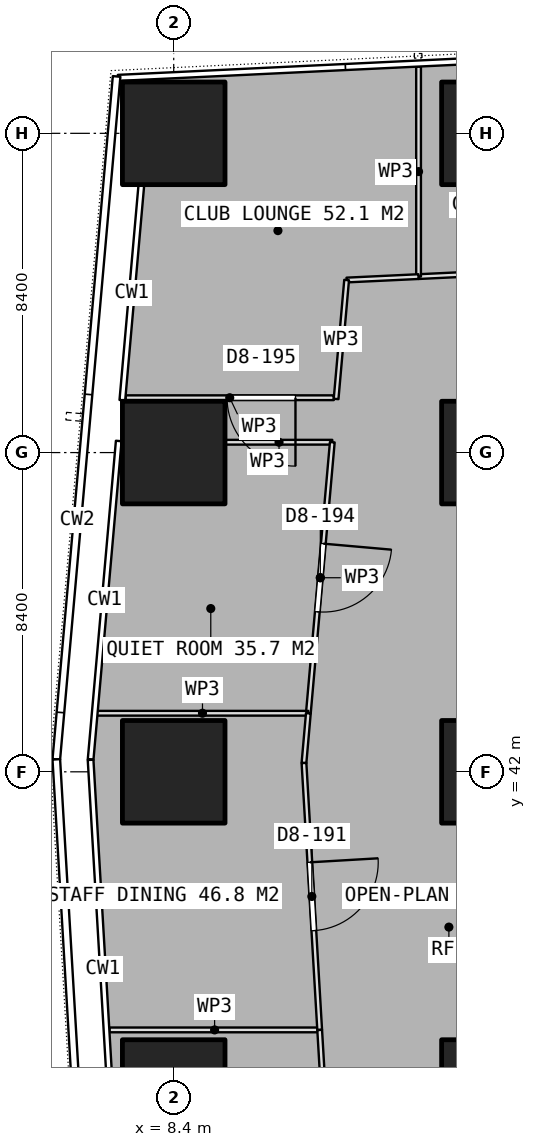
"""IFC4 building model, lengths in metres.
Left out: names, types, materials, properties, quantities, classifications, styles, units other than length and angle.
Written with IfcOpenShell. Run it as: python <this file> out.ifc"""

import sys

from ifc_helpers import new_model, si_unit, direction, frame, frame_2d, origin, origin_2d, place, context, subcontext, project, spatial, rectangle, extrude, element, fill, save


model = new_model("IFC4")
c1 = context("Model", 3, precision=1e-05, world=origin(), true_north=direction((0.0, 1.0)))
c2 = subcontext(c1, "Body", "Model", "MODEL_VIEW")
j1 = project(units=[si_unit("LENGTHUNIT", "METRE"), si_unit("PLANEANGLEUNIT", "RADIAN")], contexts=[c1])
p1 = place(None, origin())
s1 = spatial("IfcSite", under=j1, at=p1, CompositionType="ELEMENT")
p2 = place(p1, origin())
s2 = spatial("IfcBuilding", under=s1, at=p2, CompositionType="ELEMENT")
p3 = place(p2, frame((0.0, 0.0, 172.7)))
s3 = spatial("IfcBuildingStorey", under=s2, at=p3, CompositionType="ELEMENT", Elevation=172.7)
for number, where, z_axis, x_axis in (
    (1, (8.4, 33.6, 0.0), (0.0, 0.0, 1.0), (1.0, 0.0, 0.0)),
    (2, (8.4, 42.0, 0.0), (0.0, 0.0, 1.0), (1.0, 0.0, 0.0)),
    (3, (8.4, 50.4, 0.0), (0.0, 0.0, 1.0), (1.0, 0.0, 0.0)),
    (4, (8.4, 58.8, 0.0), (0.0, 0.0, 1.0), (1.0, 0.0, 0.0)),
    (5, (16.8, 33.6, 0.0), (0.0, 0.0, 1.0), (1.0, 0.0, 0.0)),
    (6, (16.8, 42.0, 0.0), (0.0, 0.0, 1.0), (1.0, 0.0, 0.0)),
    (7, (16.8, 50.4, 0.0), (0.0, 0.0, 1.0), (1.0, 0.0, 0.0)),
    (8, (16.8, 58.8, 0.0), (0.0, 0.0, 1.0), (1.0, 0.0, 0.0)),
):
    element("IfcColumn", number, at=place(p3, frame(where, z_axis=z_axis, x_axis=x_axis)), inside=s3, PredefinedType="COLUMN", context=c2, shape_type="SweptSolid", body=[
        extrude(rectangle(XDim=2.7, YDim=2.7, at=origin_2d()), origin(), (0.0, 0.0, 1.0), 3.75),
    ])
p4 = place(p3, frame((22.4, 55.392, 0.0), z_axis=(0.0, 0.0, 1.0), x_axis=(-0.998854223515, -0.047856453768, 0.0)))
e9 = element("IfcWall", 9, at=p4, inside=s3, PredefinedType="PARTITIONING", context=c2, shape_type="SweptSolid", body=[
    extrude(rectangle(XDim=7.566, YDim=0.125, at=frame_2d((3.783, 0.0))), origin(), (0.0, 0.0, 1.0), 3.5),
])
p5 = place(p4, frame((2.883, 0.0, 0.0)))
e10 = element("IfcOpeningElement", 10, at=p5, cuts=e9, PredefinedType="OPENING", context=c2, shape_type="SweptSolid", body=[
    extrude(rectangle(XDim=1.8, YDim=2.1, at=frame_2d((0.9, 1.05))), frame((0.0, 0.073, 0.0), z_axis=(0.0, -1.0, 0.0), x_axis=(1.0, 0.0, 0.0)), (0.0, 0.0, 1.0), 0.145),
])
p6 = place(p3, frame((14.843, 55.03, 0.0), z_axis=(0.0, 0.0, 1.0), x_axis=(0.0, 1.0, 0.0)))
e11 = element("IfcWall", 11, at=p6, inside=s3, PredefinedType="PARTITIONING", context=c2, shape_type="SweptSolid", body=[
    extrude(rectangle(XDim=5.527, YDim=0.125, at=frame_2d((2.763, 0.0))), origin(), (0.0, 0.0, 1.0), 3.5),
])
p7 = place(p3, frame((12.613, 51.843, 0.0), z_axis=(0.0, 0.0, 1.0), x_axis=(-1.0, 0.0, 0.0)))
e12 = element("IfcWall", 12, at=p7, inside=s3, PredefinedType="PARTITIONING", context=c2, shape_type="SweptSolid", body=[
    extrude(rectangle(XDim=5.478, YDim=0.125, at=frame_2d((2.739, 0.0))), origin(), (0.0, 0.0, 1.0), 3.5),
])
p8 = place(p7, frame((1.009, 0.0, 0.0)))
e13 = element("IfcOpeningElement", 13, at=p8, cuts=e12, PredefinedType="OPENING", context=c2, shape_type="SweptSolid", body=[
    extrude(rectangle(XDim=1.8, YDim=2.1, at=frame_2d((0.9, 1.05))), frame((0.0, 0.073, 0.0), z_axis=(0.0, -1.0, 0.0), x_axis=(1.0, 0.0, 0.0)), (0.0, 0.0, 1.0), 0.145),
])
p9 = place(p3, frame((14.842, 55.03, 0.0), z_axis=(0.0, 0.0, 1.0), x_axis=(-0.998868429304, -0.04755902586, 0.0)))
e14 = element("IfcWall", 14, at=p9, inside=s3, PredefinedType="PARTITIONING", context=c2, shape_type="SweptSolid", body=[
    extrude(rectangle(XDim=1.894, YDim=0.125, at=frame_2d((0.947, 0.0))), origin(), (0.0, 0.0, 1.0), 3.5),
])
p10 = place(p3, frame((12.95, 54.94, 0.0), z_axis=(0.0, 0.0, 1.0), x_axis=(-0.088138787715, -0.996108204012, 0.0)))
e15 = element("IfcWall", 15, at=p10, inside=s3, PredefinedType="PARTITIONING", context=c2, shape_type="SweptSolid", body=[
    extrude(rectangle(XDim=3.141, YDim=0.125, at=frame_2d((1.571, 0.0))), origin(), (0.0, 0.0, 1.0), 3.5),
])
p11 = place(p3, frame((9.77, 50.672, 0.0), z_axis=(0.0, 0.0, 1.0), x_axis=(1.0, 0.0, 0.0)))
e16 = element("IfcWall", 16, at=p11, inside=s3, PredefinedType="PARTITIONING", context=c2, shape_type="SweptSolid", body=[
    extrude(rectangle(XDim=2.803, YDim=0.125, at=frame_2d((1.401, 0.0))), origin(), (0.0, 0.0, 1.0), 3.5),
])
p12 = place(p3, frame((12.573, 50.672, 0.0), z_axis=(0.0, 0.0, 1.0), x_axis=(-0.087986371685, -0.99612167851, 0.0)))
e17 = element("IfcWall", 17, at=p12, inside=s3, PredefinedType="PARTITIONING", context=c2, shape_type="SweptSolid", body=[
    extrude(rectangle(XDim=7.159, YDim=0.125, at=frame_2d((3.58, 0.0))), origin(), (0.0, 0.0, 1.0), 3.5),
])
p13 = place(p12, frame((2.679, 0.0, 0.0)))
e18 = element("IfcOpeningElement", 18, at=p13, cuts=e17, PredefinedType="OPENING", context=c2, shape_type="SweptSolid", body=[
    extrude(rectangle(XDim=1.8, YDim=2.1, at=frame_2d((0.9, 1.05))), frame((0.0, 0.073, 0.0), z_axis=(0.0, -1.0, 0.0), x_axis=(1.0, 0.0, 0.0)), (0.0, 0.0, 1.0), 0.145),
])
p14 = place(p3, frame((11.943, 43.541, 0.0), z_axis=(0.0, 0.0, 1.0), x_axis=(-1.0, 0.0, 0.0)))
e19 = element("IfcWall", 19, at=p14, inside=s3, PredefinedType="PARTITIONING", context=c2, shape_type="SweptSolid", body=[
    extrude(rectangle(XDim=5.572, YDim=0.125, at=frame_2d((2.786, 0.0))), origin(), (0.0, 0.0, 1.0), 3.5),
])
p15 = place(p3, frame((12.241, 35.209, 0.0), z_axis=(0.0, 0.0, 1.0), x_axis=(-1.0, 0.0, 0.0)))
e20 = element("IfcWall", 20, at=p15, inside=s3, PredefinedType="PARTITIONING", context=c2, shape_type="SweptSolid", body=[
    extrude(rectangle(XDim=5.53, YDim=0.125, at=frame_2d((2.765, 0.0))), origin(), (0.0, 0.0, 1.0), 3.5),
])
p16 = place(p3, frame((11.943, 43.54, 0.0), z_axis=(0.0, 0.0, 1.0), x_axis=(-0.087752736056, -0.996142287685, 0.0)))
e21 = element("IfcWall", 21, at=p16, inside=s3, PredefinedType="PARTITIONING", context=c2, shape_type="SweptSolid", body=[
    extrude(rectangle(XDim=1.313, YDim=0.125, at=frame_2d((0.657, 0.0))), origin(), (0.0, 0.0, 1.0), 3.5),
])
p17 = place(p3, frame((11.828, 42.232, 0.0), z_axis=(0.0, 0.0, 1.0), x_axis=(0.05871795329, -0.9982746125, 0.0)))
e22 = element("IfcWall", 22, at=p17, inside=s3, PredefinedType="PARTITIONING", context=c2, shape_type="SweptSolid", body=[
    extrude(rectangle(XDim=7.035, YDim=0.125, at=frame_2d((3.518, 0.0))), origin(), (0.0, 0.0, 1.0), 3.5),
])
p18 = place(p17, frame((2.618, 0.0, 0.0)))
e23 = element("IfcOpeningElement", 23, at=p18, cuts=e22, PredefinedType="OPENING", context=c2, shape_type="SweptSolid", body=[
    extrude(rectangle(XDim=1.8, YDim=2.1, at=frame_2d((0.9, 1.05))), frame((0.0, 0.073, 0.0), z_axis=(0.0, -1.0, 0.0), x_axis=(1.0, 0.0, 0.0)), (0.0, 0.0, 1.0), 0.145),
])
p19 = place(p3, frame((12.241, 35.208, 0.0), z_axis=(0.0, 0.0, 1.0), x_axis=(0.058746940791, -0.998272907049, 0.0)))
e24 = element("IfcWall", 24, at=p19, inside=s3, PredefinedType="PARTITIONING", context=c2, shape_type="SweptSolid", body=[
    extrude(rectangle(XDim=8.615, YDim=0.125, at=frame_2d((4.308, 0.0))), origin(), (0.0, 0.0, 1.0), 3.5),
])
p20 = place(p19, frame((3.407, 0.0, 0.0)))
e25 = element("IfcOpeningElement", 25, at=p20, cuts=e24, PredefinedType="OPENING", context=c2, shape_type="SweptSolid", body=[
    extrude(rectangle(XDim=1.8, YDim=2.1, at=frame_2d((0.9, 1.05))), frame((0.0, 0.073, 0.0), z_axis=(0.0, -1.0, 0.0), x_axis=(1.0, 0.0, 0.0)), (0.0, 0.0, 1.0), 0.145),
])
p21 = place(p8, origin())
e26 = element("IfcDoor", 26, at=p21, inside=s3, OperationType="DOUBLE_DOOR_SINGLE_SWING", PredefinedType="DOOR", context=c2, shape_type="SweptSolid", body=[
    extrude(rectangle(XDim=1.8, YDim=2.1, at=frame_2d((0.9, 1.05))), frame((0.0, 0.025, 0.0), z_axis=(0.0, -1.0, 0.0), x_axis=(1.0, 0.0, 0.0)), (0.0, 0.0, 1.0), 0.05),
])
fill(e13, e26)
p22 = place(p13, origin())
e27 = element("IfcDoor", 27, at=p22, inside=s3, OperationType="DOUBLE_DOOR_SINGLE_SWING", PredefinedType="DOOR", context=c2, shape_type="SweptSolid", body=[
    extrude(rectangle(XDim=1.8, YDim=2.1, at=frame_2d((0.9, 1.05))), frame((0.0, 0.025, 0.0), z_axis=(0.0, -1.0, 0.0), x_axis=(1.0, 0.0, 0.0)), (0.0, 0.0, 1.0), 0.05),
])
fill(e18, e27)
p23 = place(p18, origin())
e28 = element("IfcDoor", 28, at=p23, inside=s3, OperationType="DOUBLE_DOOR_SINGLE_SWING", PredefinedType="DOOR", context=c2, shape_type="SweptSolid", body=[
    extrude(rectangle(XDim=1.8, YDim=2.1, at=frame_2d((0.9, 1.05))), frame((0.0, 0.025, 0.0), z_axis=(0.0, -1.0, 0.0), x_axis=(1.0, 0.0, 0.0)), (0.0, 0.0, 1.0), 0.05),
])
fill(e23, e28)
save(model, sys.argv[1])
